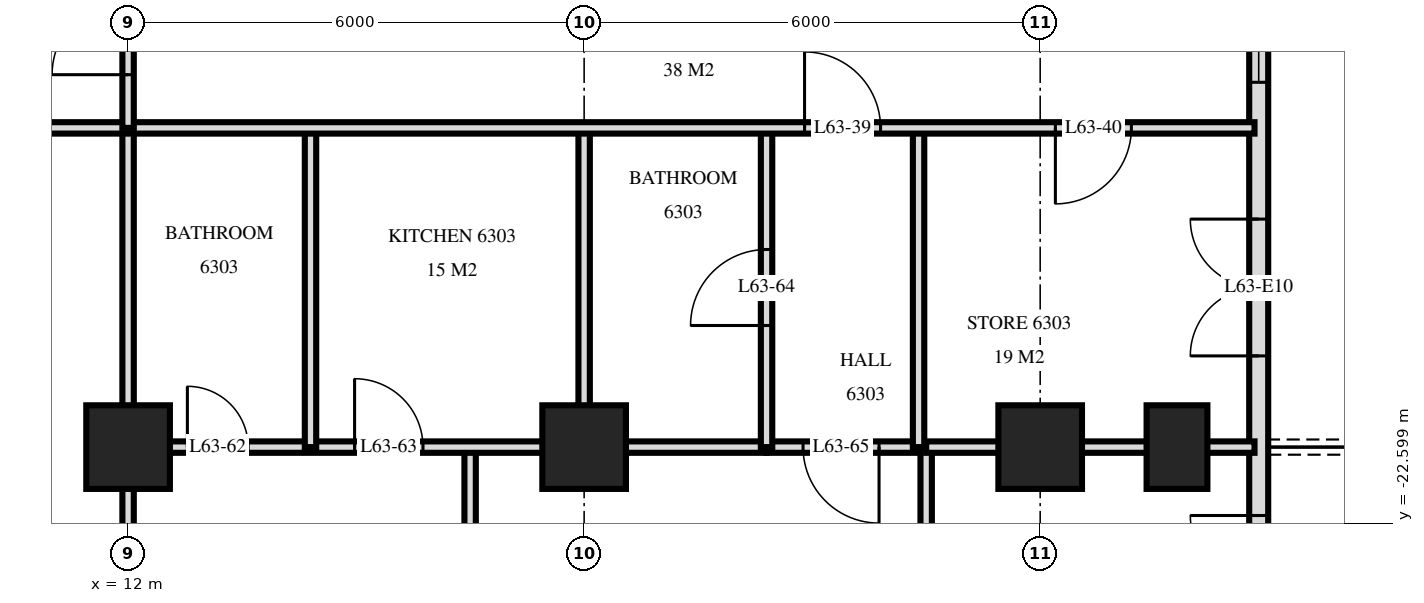
"""IFC4 building model, lengths in metres.
Left out: names, types, materials, properties, quantities, classifications, styles, units other than length and angle.
Written with IfcOpenShell. Run it as: python <this file> out.ifc"""

import sys

from ifc_helpers import new_model, si_unit, direction, frame, frame_2d, origin, origin_2d, place, context, subcontext, project, spatial, rectangle, extrude, element, fill, save


model = new_model("IFC4")
c1 = context("Model", 3, precision=1e-05, world=origin(), true_north=direction((0.0, 1.0)))
c2 = subcontext(c1, "Body", "Model", "MODEL_VIEW")
j1 = project(units=[si_unit("LENGTHUNIT", "METRE"), si_unit("PLANEANGLEUNIT", "RADIAN")], contexts=[c1])
p1 = place(None, origin())
s1 = spatial("IfcSite", under=j1, at=p1, CompositionType="ELEMENT")
p2 = place(p1, origin())
s2 = spatial("IfcBuilding", under=s1, at=p2, CompositionType="ELEMENT")
p3 = place(p2, frame((0.0, 0.0, 239.6)))
s3 = spatial("IfcBuildingStorey", under=s2, at=p3, CompositionType="ELEMENT", Elevation=239.6)
for number, where, z_axis, x_axis in (
    (1, (12.0, -21.6, 0.0), (0.0, 0.0, 1.0), (1.0, 0.0, 0.0)),
    (2, (18.0, -21.6, 0.0), (0.0, 0.0, 1.0), (1.0, 0.0, 0.0)),
    (3, (24.0, -21.6, 0.0), (0.0, 0.0, 1.0), (1.0, 0.0, 0.0)),
):
    element("IfcColumn", number, at=place(p3, frame(where, z_axis=z_axis, x_axis=x_axis)), inside=s3, PredefinedType="COLUMN", context=c2, shape_type="SweptSolid", body=[
        extrude(rectangle(XDim=1.1, YDim=1.1, at=origin_2d()), origin(), (0.0, 0.0, 1.0), 3.5),
    ])
p4 = place(p3, frame((25.8, -21.6, 0.0), z_axis=(0.0, 0.0, 1.0), x_axis=(0.0, 1.0, 0.0)))
e4 = element("IfcColumn", 4, at=p4, inside=s3, PredefinedType="COLUMN", context=c2, shape_type="SweptSolid", body=[
    extrude(rectangle(XDim=1.1, YDim=0.8, at=origin_2d()), origin(), (0.0, 0.0, 1.0), 3.5),
])
p5 = place(p3, frame((26.875, -24.875, 0.0), z_axis=(0.0, 0.0, 1.0), x_axis=(0.0, 1.0, 0.0)))
e5 = element("IfcWall", 5, at=p5, inside=s3, PredefinedType="SOLIDWALL", context=c2, shape_type="SweptSolid", body=[
    extrude(rectangle(XDim=21.551, YDim=0.25, at=frame_2d((10.775, 0.0))), origin(), (0.0, 0.0, 1.0), 3.22),
])
p6 = place(p5, frame((0.575, 0.0, 0.0)))
e6 = element("IfcOpeningElement", 6, at=p6, cuts=e5, PredefinedType="OPENING", context=c2, shape_type="SweptSolid", body=[
    extrude(rectangle(XDim=1.8, YDim=2.4, at=frame_2d((0.9, 1.2))), frame((0.0, 0.135, 0.0), z_axis=(0.0, -1.0, 0.0), x_axis=(1.0, 0.0, 0.0)), (0.0, 0.0, 1.0), 0.27),
])
p7 = place(p5, frame((4.475, 0.0, 0.0)))
e7 = element("IfcOpeningElement", 7, at=p7, cuts=e5, PredefinedType="OPENING", context=c2, shape_type="SweptSolid", body=[
    extrude(rectangle(XDim=1.8, YDim=2.4, at=frame_2d((0.9, 1.2))), frame((0.0, 0.135, 0.0), z_axis=(0.0, -1.0, 0.0), x_axis=(1.0, 0.0, 0.0)), (0.0, 0.0, 1.0), 0.27),
])
p8 = place(p5, frame((8.075, 0.0, 0.9)))
e8 = element("IfcOpeningElement", 8, at=p8, cuts=e5, PredefinedType="OPENING", context=c2, shape_type="SweptSolid", body=[
    extrude(rectangle(XDim=1.2, YDim=1.5, at=frame_2d((0.6, 0.75))), frame((0.0, 0.135, 0.0), z_axis=(0.0, -1.0, 0.0), x_axis=(1.0, 0.0, 0.0)), (0.0, 0.0, 1.0), 0.27),
])
p9 = place(p5, frame((12.225, 0.0, 0.0)))
e9 = element("IfcOpeningElement", 9, at=p9, cuts=e5, PredefinedType="OPENING", context=c2, shape_type="SweptSolid", body=[
    extrude(rectangle(XDim=1.8, YDim=2.4, at=frame_2d((0.9, 1.2))), frame((0.0, 0.135, 0.0), z_axis=(0.0, -1.0, 0.0), x_axis=(1.0, 0.0, 0.0)), (0.0, 0.0, 1.0), 0.27),
])
p10 = place(p3, frame((22.5, -29.217, 0.0), z_axis=(0.0, 0.0, 1.0), x_axis=(0.0, 1.0, 0.0)))
e10 = element("IfcWall", 10, at=p10, inside=s3, PredefinedType="PARTITIONING", context=c2, shape_type="SweptSolid", body=[
    extrude(rectangle(XDim=7.616, YDim=0.15, at=frame_2d((3.808, 0.0))), origin(), (0.0, 0.0, 1.0), 3.22),
])
p11 = place(p10, frame((3.247, 0.0, 0.0)))
e11 = element("IfcOpeningElement", 11, at=p11, cuts=e10, PredefinedType="OPENING", context=c2, shape_type="SweptSolid", body=[
    extrude(rectangle(XDim=0.9, YDim=2.1, at=frame_2d((0.45, 1.05))), frame((0.0, 0.085, 0.0), z_axis=(0.0, -1.0, 0.0), x_axis=(1.0, 0.0, 0.0)), (0.0, 0.0, 1.0), 0.17),
])
p12 = place(p3, frame((22.4, -21.6, 0.0), z_axis=(0.0, 0.0, 1.0), x_axis=(0.0, 1.0, 0.0)))
e12 = element("IfcWall", 12, at=p12, inside=s3, PredefinedType="PARTITIONING", context=c2, shape_type="SweptSolid", body=[
    extrude(rectangle(XDim=4.2, YDim=0.15, at=frame_2d((2.1, 0.0))), origin(), (0.0, 0.0, 1.0), 3.22),
])
p13 = place(p3, frame((20.4, -21.6, 0.0), z_axis=(0.0, 0.0, 1.0), x_axis=(0.0, 1.0, 0.0)))
e13 = element("IfcWall", 13, at=p13, inside=s3, PredefinedType="PARTITIONING", context=c2, shape_type="SweptSolid", body=[
    extrude(rectangle(XDim=4.2, YDim=0.15, at=frame_2d((2.1, 0.0))), origin(), (0.0, 0.0, 1.0), 3.22),
])
p14 = place(p13, frame((1.6, 0.0, 0.0)))
e14 = element("IfcOpeningElement", 14, at=p14, cuts=e13, PredefinedType="OPENING", context=c2, shape_type="SweptSolid", body=[
    extrude(rectangle(XDim=1.0, YDim=2.1, at=frame_2d((0.5, 1.05))), frame((0.0, 0.085, 0.0), z_axis=(0.0, -1.0, 0.0), x_axis=(1.0, 0.0, 0.0)), (0.0, 0.0, 1.0), 0.17),
])
p15 = place(p3, frame((18.0, -21.6, 0.0), z_axis=(0.0, 0.0, 1.0), x_axis=(0.0, 1.0, 0.0)))
e15 = element("IfcWall", 15, at=p15, inside=s3, PredefinedType="PARTITIONING", context=c2, shape_type="SweptSolid", body=[
    extrude(rectangle(XDim=4.2, YDim=0.15, at=frame_2d((2.1, 0.0))), origin(), (0.0, 0.0, 1.0), 3.22),
])
p16 = place(p3, frame((16.5, -29.22, 0.0), z_axis=(0.0, 0.0, 1.0), x_axis=(0.0, 1.0, 0.0)))
e16 = element("IfcWall", 16, at=p16, inside=s3, PredefinedType="PARTITIONING", context=c2, shape_type="SweptSolid", body=[
    extrude(rectangle(XDim=7.62, YDim=0.15, at=frame_2d((3.81, 0.0))), origin(), (0.0, 0.0, 1.0), 3.22),
])
p17 = place(p16, frame((3.29, 0.0, 0.0)))
e17 = element("IfcOpeningElement", 17, at=p17, cuts=e16, PredefinedType="OPENING", context=c2, shape_type="SweptSolid", body=[
    extrude(rectangle(XDim=0.9, YDim=2.1, at=frame_2d((0.45, 1.05))), frame((0.0, 0.085, 0.0), z_axis=(0.0, -1.0, 0.0), x_axis=(1.0, 0.0, 0.0)), (0.0, 0.0, 1.0), 0.17),
])
p18 = place(p3, frame((14.4, -21.6, 0.0), z_axis=(0.0, 0.0, 1.0), x_axis=(0.0, 1.0, 0.0)))
e18 = element("IfcWall", 18, at=p18, inside=s3, PredefinedType="PARTITIONING", context=c2, shape_type="SweptSolid", body=[
    extrude(rectangle(XDim=4.2, YDim=0.15, at=frame_2d((2.1, 0.0))), origin(), (0.0, 0.0, 1.0), 3.22),
])
p19 = place(p3, frame((12.0, -17.4, 0.0), z_axis=(0.0, 0.0, 1.0), x_axis=(0.0, 1.0, 0.0)))
e19 = element("IfcWall", 19, at=p19, inside=s3, PredefinedType="PARTITIONING", context=c2, shape_type="SweptSolid", body=[
    extrude(rectangle(XDim=2.35, YDim=0.15, at=frame_2d((1.175, 0.0))), origin(), (0.0, 0.0, 1.0), 3.22),
])
p20 = place(p19, frame((0.7, 0.0, 0.0)))
e20 = element("IfcOpeningElement", 20, at=p20, cuts=e19, PredefinedType="OPENING", context=c2, shape_type="SweptSolid", body=[
    extrude(rectangle(XDim=1.0, YDim=2.1, at=frame_2d((0.5, 1.05))), frame((0.0, 0.085, 0.0), z_axis=(0.0, -1.0, 0.0), x_axis=(1.0, 0.0, 0.0)), (0.0, 0.0, 1.0), 0.17),
])
p21 = place(p3, frame((12.0, -29.22, 0.0), z_axis=(0.0, 0.0, 1.0), x_axis=(0.0, 1.0, 0.0)))
e21 = element("IfcWall", 21, at=p21, inside=s3, PredefinedType="PARTITIONING", context=c2, shape_type="SweptSolid", body=[
    extrude(rectangle(XDim=11.82, YDim=0.15, at=frame_2d((5.91, 0.0))), origin(), (0.0, 0.0, 1.0), 3.22),
])
p22 = place(p3, frame((20.4, -21.6, 0.0), z_axis=(0.0, 0.0, 1.0), x_axis=(1.0, 0.0, 0.0)))
e22 = element("IfcWall", 22, at=p22, inside=s3, PredefinedType="PARTITIONING", context=c2, shape_type="SweptSolid", body=[
    extrude(rectangle(XDim=2.0, YDim=0.15, at=frame_2d((1.0, 0.0))), origin(), (0.0, 0.0, 1.0), 3.22),
])
p23 = place(p22, frame((0.48, 0.0, 0.0)))
e23 = element("IfcOpeningElement", 23, at=p23, cuts=e22, PredefinedType="OPENING", context=c2, shape_type="SweptSolid", body=[
    extrude(rectangle(XDim=1.0, YDim=2.1, at=frame_2d((0.5, 1.05))), frame((0.0, 0.085, 0.0), z_axis=(0.0, -1.0, 0.0), x_axis=(1.0, 0.0, 0.0)), (0.0, 0.0, 1.0), 0.17),
])
p24 = place(p3, frame((12.0, -21.6, 0.0), z_axis=(0.0, 0.0, 1.0), x_axis=(1.0, 0.0, 0.0)))
e24 = element("IfcWall", 24, at=p24, inside=s3, PredefinedType="PARTITIONING", context=c2, shape_type="SweptSolid", body=[
    extrude(rectangle(XDim=8.4, YDim=0.15, at=frame_2d((4.2, 0.0))), origin(), (0.0, 0.0, 1.0), 3.22),
])
p25 = place(p24, frame((0.78, 0.0, 0.0)))
e25 = element("IfcOpeningElement", 25, at=p25, cuts=e24, PredefinedType="OPENING", context=c2, shape_type="SweptSolid", body=[
    extrude(rectangle(XDim=0.8, YDim=2.1, at=frame_2d((0.4, 1.05))), frame((0.0, 0.085, 0.0), z_axis=(0.0, -1.0, 0.0), x_axis=(1.0, 0.0, 0.0)), (0.0, 0.0, 1.0), 0.17),
])
p26 = place(p24, frame((2.98, 0.0, 0.0)))
e26 = element("IfcOpeningElement", 26, at=p26, cuts=e24, PredefinedType="OPENING", context=c2, shape_type="SweptSolid", body=[
    extrude(rectangle(XDim=0.9, YDim=2.1, at=frame_2d((0.45, 1.05))), frame((0.0, 0.085, 0.0), z_axis=(0.0, -1.0, 0.0), x_axis=(1.0, 0.0, 0.0)), (0.0, 0.0, 1.0), 0.17),
])
p27 = place(p3, frame((22.5, -21.6, 0.0), z_axis=(0.0, 0.0, 1.0), x_axis=(1.0, 0.0, 0.0)))
e27 = element("IfcWall", 27, at=p27, inside=s3, PredefinedType="PARTITIONING", context=c2, shape_type="SweptSolid", body=[
    extrude(rectangle(XDim=4.32, YDim=0.15, at=frame_2d((2.16, 0.0))), origin(), (0.0, 0.0, 1.0), 3.22),
])
p28 = place(p3, frame((-26.82, -17.4, 0.0), z_axis=(0.0, 0.0, 1.0), x_axis=(1.0, 0.0, 0.0)))
e28 = element("IfcWall", 28, at=p28, inside=s3, PredefinedType="PARTITIONING", context=c2, shape_type="SweptSolid", body=[
    extrude(rectangle(XDim=53.64, YDim=0.15, at=frame_2d((26.82, 0.0))), origin(), (0.0, 0.0, 1.0), 3.22),
])
p29 = place(p28, frame((11.97, 0.0, 0.0)))
e29 = element("IfcOpeningElement", 29, at=p29, cuts=e28, PredefinedType="OPENING", context=c2, shape_type="SweptSolid", body=[
    extrude(rectangle(XDim=1.0, YDim=2.1, at=frame_2d((0.5, 1.05))), frame((0.0, 0.085, 0.0), z_axis=(0.0, -1.0, 0.0), x_axis=(1.0, 0.0, 0.0)), (0.0, 0.0, 1.0), 0.17),
])
p30 = place(p28, frame((3.92, 0.0, 0.0)))
e30 = element("IfcOpeningElement", 30, at=p30, cuts=e28, PredefinedType="OPENING", context=c2, shape_type="SweptSolid", body=[
    extrude(rectangle(XDim=1.0, YDim=2.1, at=frame_2d((0.5, 1.05))), frame((0.0, 0.085, 0.0), z_axis=(0.0, -1.0, 0.0), x_axis=(1.0, 0.0, 0.0)), (0.0, 0.0, 1.0), 0.17),
])
p31 = place(p28, frame((5.72, 0.0, 0.0)))
e31 = element("IfcOpeningElement", 31, at=p31, cuts=e28, PredefinedType="OPENING", context=c2, shape_type="SweptSolid", body=[
    extrude(rectangle(XDim=1.0, YDim=2.1, at=frame_2d((0.5, 1.05))), frame((0.0, 0.085, 0.0), z_axis=(0.0, -1.0, 0.0), x_axis=(1.0, 0.0, 0.0)), (0.0, 0.0, 1.0), 0.17),
])
p32 = place(p28, frame((47.72, 0.0, 0.0)))
e32 = element("IfcOpeningElement", 32, at=p32, cuts=e28, PredefinedType="OPENING", context=c2, shape_type="SweptSolid", body=[
    extrude(rectangle(XDim=1.0, YDim=2.1, at=frame_2d((0.5, 1.05))), frame((0.0, 0.085, 0.0), z_axis=(0.0, -1.0, 0.0), x_axis=(1.0, 0.0, 0.0)), (0.0, 0.0, 1.0), 0.17),
])
p33 = place(p28, frame((51.02, 0.0, 0.0)))
e33 = element("IfcOpeningElement", 33, at=p33, cuts=e28, PredefinedType="OPENING", context=c2, shape_type="SweptSolid", body=[
    extrude(rectangle(XDim=1.0, YDim=2.1, at=frame_2d((0.5, 1.05))), frame((0.0, 0.085, 0.0), z_axis=(0.0, -1.0, 0.0), x_axis=(1.0, 0.0, 0.0)), (0.0, 0.0, 1.0), 0.17),
])
p34 = place(p28, frame((17.32, 0.0, 0.0)))
e34 = element("IfcOpeningElement", 34, at=p34, cuts=e28, PredefinedType="OPENING", context=c2, shape_type="SweptSolid", body=[
    extrude(rectangle(XDim=1.0, YDim=2.1, at=frame_2d((0.5, 1.05))), frame((0.0, 0.085, 0.0), z_axis=(0.0, -1.0, 0.0), x_axis=(1.0, 0.0, 0.0)), (0.0, 0.0, 1.0), 0.17),
])
p35 = place(p28, frame((23.32, 0.0, 0.0)))
e35 = element("IfcOpeningElement", 35, at=p35, cuts=e28, PredefinedType="OPENING", context=c2, shape_type="SweptSolid", body=[
    extrude(rectangle(XDim=1.0, YDim=2.1, at=frame_2d((0.5, 1.05))), frame((0.0, 0.085, 0.0), z_axis=(0.0, -1.0, 0.0), x_axis=(1.0, 0.0, 0.0)), (0.0, 0.0, 1.0), 0.17),
])
p36 = place(p28, frame((29.32, 0.0, 0.0)))
e36 = element("IfcOpeningElement", 36, at=p36, cuts=e28, PredefinedType="OPENING", context=c2, shape_type="SweptSolid", body=[
    extrude(rectangle(XDim=1.0, YDim=2.1, at=frame_2d((0.5, 1.05))), frame((0.0, 0.085, 0.0), z_axis=(0.0, -1.0, 0.0), x_axis=(1.0, 0.0, 0.0)), (0.0, 0.0, 1.0), 0.17),
])
p37 = place(p28, frame((35.32, 0.0, 0.0)))
e37 = element("IfcOpeningElement", 37, at=p37, cuts=e28, PredefinedType="OPENING", context=c2, shape_type="SweptSolid", body=[
    extrude(rectangle(XDim=1.0, YDim=2.1, at=frame_2d((0.5, 1.05))), frame((0.0, 0.085, 0.0), z_axis=(0.0, -1.0, 0.0), x_axis=(1.0, 0.0, 0.0)), (0.0, 0.0, 1.0), 0.17),
])
p38 = place(p6, origin())
e38 = element("IfcDoor", 38, at=p38, inside=s3, OperationType="DOUBLE_DOOR_SINGLE_SWING", PredefinedType="DOOR", context=c2, shape_type="SweptSolid", body=[
    extrude(rectangle(XDim=1.8, YDim=2.4, at=frame_2d((0.9, 1.2))), frame((0.0, 0.025, 0.0), z_axis=(0.0, -1.0, 0.0), x_axis=(1.0, 0.0, 0.0)), (0.0, 0.0, 1.0), 0.05),
])
fill(e6, e38)
p39 = place(p7, origin())
e39 = element("IfcDoor", 39, at=p39, inside=s3, OperationType="DOUBLE_DOOR_SINGLE_SWING", PredefinedType="DOOR", context=c2, shape_type="SweptSolid", body=[
    extrude(rectangle(XDim=1.8, YDim=2.4, at=frame_2d((0.9, 1.2))), frame((0.0, 0.025, 0.0), z_axis=(0.0, -1.0, 0.0), x_axis=(1.0, 0.0, 0.0)), (0.0, 0.0, 1.0), 0.05),
])
fill(e7, e39)
p40 = place(p8, origin())
e40 = element("IfcWindow", 40, at=p40, inside=s3, PartitioningType="SINGLE_PANEL", PredefinedType="WINDOW", context=c2, shape_type="SweptSolid", body=[
    extrude(rectangle(XDim=1.2, YDim=1.5, at=frame_2d((0.6, 0.75))), frame((0.0, 0.03, 0.0), z_axis=(0.0, -1.0, 0.0), x_axis=(1.0, 0.0, 0.0)), (0.0, 0.0, 1.0), 0.06),
])
fill(e8, e40)
p41 = place(p20, origin())
e41 = element("IfcDoor", 41, at=p41, inside=s3, OperationType="SINGLE_SWING_RIGHT", PredefinedType="DOOR", context=c2, shape_type="SweptSolid", body=[
    extrude(rectangle(XDim=1.0, YDim=2.1, at=frame_2d((0.5, 1.05))), frame((0.0, 0.025, 0.0), z_axis=(0.0, -1.0, 0.0), x_axis=(1.0, 0.0, 0.0)), (0.0, 0.0, 1.0), 0.05),
])
fill(e20, e41)
p42 = place(p32, origin())
e42 = element("IfcDoor", 42, at=p42, inside=s3, OperationType="SINGLE_SWING_RIGHT", PredefinedType="DOOR", context=c2, shape_type="SweptSolid", body=[
    extrude(rectangle(XDim=1.0, YDim=2.1, at=frame_2d((0.5, 1.05))), frame((0.0, 0.025, 0.0), z_axis=(0.0, -1.0, 0.0), x_axis=(1.0, 0.0, 0.0)), (0.0, 0.0, 1.0), 0.05),
])
fill(e32, e42)
p43 = place(p33, frame((0.5, 0.0, 0.0), z_axis=(0.0, 0.0, 1.0), x_axis=(-1.0, 0.0, 0.0)))
e43 = element("IfcDoor", 43, at=p43, inside=s3, OperationType="SINGLE_SWING_LEFT", PredefinedType="DOOR", context=c2, shape_type="SweptSolid", body=[
    extrude(rectangle(XDim=1.0, YDim=2.1, at=frame_2d((0.0, 1.05))), frame((0.0, -0.025, 0.0), z_axis=(0.0, 1.0, 0.0), x_axis=(-1.0, 0.0, 0.0)), (0.0, 0.0, 1.0), 0.05),
])
fill(e33, e43)
p44 = place(p25, origin())
e44 = element("IfcDoor", 44, at=p44, inside=s3, OperationType="SINGLE_SWING_RIGHT", PredefinedType="DOOR", context=c2, shape_type="SweptSolid", body=[
    extrude(rectangle(XDim=0.8, YDim=2.1, at=frame_2d((0.4, 1.05))), frame((0.0, 0.025, 0.0), z_axis=(0.0, -1.0, 0.0), x_axis=(1.0, 0.0, 0.0)), (0.0, 0.0, 1.0), 0.05),
])
fill(e25, e44)
p45 = place(p26, origin())
e45 = element("IfcDoor", 45, at=p45, inside=s3, OperationType="SINGLE_SWING_RIGHT", PredefinedType="DOOR", context=c2, shape_type="SweptSolid", body=[
    extrude(rectangle(XDim=0.9, YDim=2.1, at=frame_2d((0.45, 1.05))), frame((0.0, 0.025, 0.0), z_axis=(0.0, -1.0, 0.0), x_axis=(1.0, 0.0, 0.0)), (0.0, 0.0, 1.0), 0.05),
])
fill(e26, e45)
p46 = place(p14, origin())
e46 = element("IfcDoor", 46, at=p46, inside=s3, OperationType="SINGLE_SWING_RIGHT", PredefinedType="DOOR", context=c2, shape_type="SweptSolid", body=[
    extrude(rectangle(XDim=1.0, YDim=2.1, at=frame_2d((0.5, 1.05))), frame((0.0, 0.025, 0.0), z_axis=(0.0, -1.0, 0.0), x_axis=(1.0, 0.0, 0.0)), (0.0, 0.0, 1.0), 0.05),
])
fill(e14, e46)
p47 = place(p23, frame((0.5, 0.0, 0.0), z_axis=(0.0, 0.0, 1.0), x_axis=(-1.0, 0.0, 0.0)))
e47 = element("IfcDoor", 47, at=p47, inside=s3, OperationType="SINGLE_SWING_RIGHT", PredefinedType="DOOR", context=c2, shape_type="SweptSolid", body=[
    extrude(rectangle(XDim=1.0, YDim=2.1, at=frame_2d((0.0, 1.05))), frame((0.0, -0.025, 0.0), z_axis=(0.0, 1.0, 0.0), x_axis=(-1.0, 0.0, 0.0)), (0.0, 0.0, 1.0), 0.05),
])
fill(e23, e47)
save(model, sys.argv[1])
